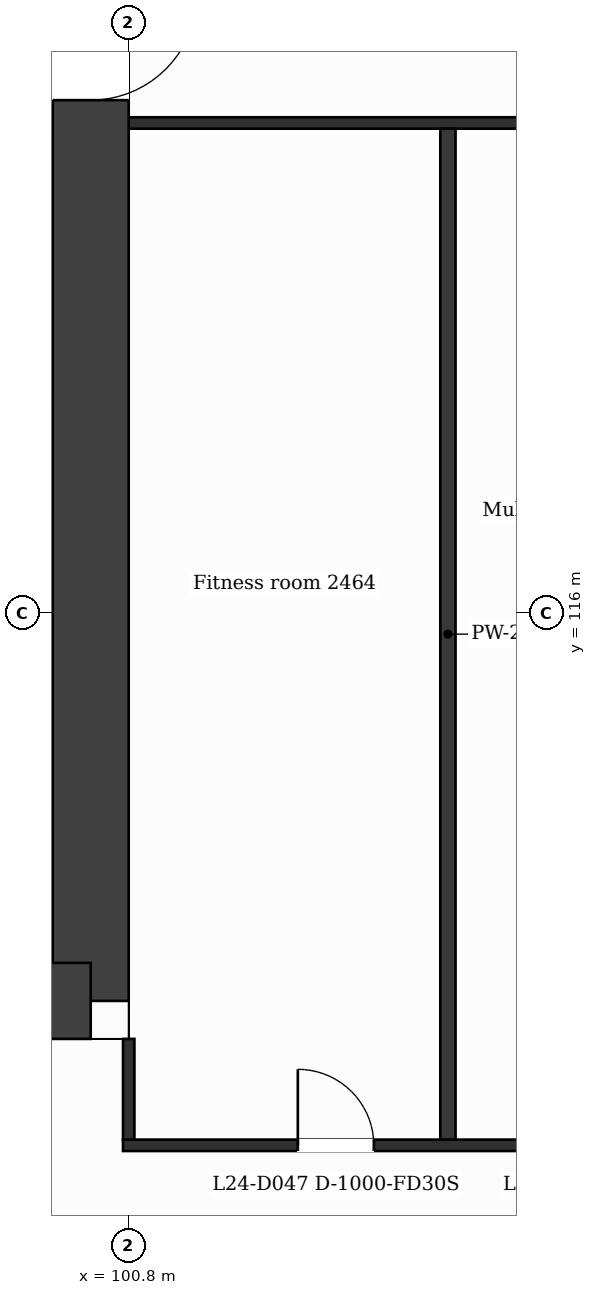
"""IFC4 building model, lengths in metres.
Left out: names, types, materials, properties, quantities, classifications, styles, units other than length and angle.
Written with IfcOpenShell. Run it as: python <this file> out.ifc"""

import sys

from ifc_helpers import new_model, si_unit, direction, frame, frame_2d, origin, place, context, subcontext, project, spatial, rectangle, extrude, element, fill, save


model = new_model("IFC4")
c1 = context("Model", 3, precision=1e-05, world=origin(), true_north=direction((0.0, 1.0)))
c2 = subcontext(c1, "Body", "Model", "MODEL_VIEW")
j1 = project(units=[si_unit("LENGTHUNIT", "METRE"), si_unit("PLANEANGLEUNIT", "RADIAN")], contexts=[c1])
p1 = place(None, origin())
s1 = spatial("IfcSite", under=j1, at=p1, CompositionType="ELEMENT")
p2 = place(p1, origin())
s2 = spatial("IfcBuilding", under=s1, at=p2, CompositionType="ELEMENT")
p3 = place(p2, frame((0.0, 0.0, 105.8)))
s3 = spatial("IfcBuildingStorey", under=s2, at=p3, CompositionType="ELEMENT", Elevation=105.8)
p4 = place(p3, frame((100.3, 131.9, 0.0), z_axis=(0.0, 0.0, 1.0), x_axis=(0.0, -1.0, 0.0)))
e1 = element("IfcWall", 1, at=p4, inside=s3, PredefinedType="SHEAR", context=c2, shape_type="SweptSolid", body=[
    extrude(rectangle(XDim=21.0, YDim=1.0, at=frame_2d((10.5, 0.0))), origin(), (0.0, 0.0, 1.0), 3.7),
])
p5 = place(p4, frame((7.75, 0.0, 0.0)))
e2 = element("IfcOpeningElement", 2, at=p5, cuts=e1, PredefinedType="OPENING", context=c2, shape_type="SweptSolid", body=[
    extrude(rectangle(XDim=1.4, YDim=2.1, at=frame_2d((0.7, 1.05))), frame((0.0, 0.51, 0.0), z_axis=(0.0, -1.0, 0.0), x_axis=(1.0, 0.0, 0.0)), (0.0, 0.0, 1.0), 1.02),
])
p6 = place(p3, frame((100.3, 110.9, 0.0), z_axis=(0.0, 0.0, 1.0), x_axis=(-1.0, 0.0, 0.0)))
e3 = element("IfcWall", 3, at=p6, inside=s3, PredefinedType="SHEAR", context=c2, shape_type="SweptSolid", body=[
    extrude(rectangle(XDim=14.059, YDim=1.0, at=frame_2d((7.03, 0.0))), origin(), (0.0, 0.0, 1.0), 3.7),
])
p7 = place(p6, frame((5.802, 0.0, 0.0)))
e4 = element("IfcOpeningElement", 4, at=p7, cuts=e3, PredefinedType="OPENING", context=c2, shape_type="SweptSolid", body=[
    extrude(rectangle(XDim=1.4, YDim=2.1, at=frame_2d((0.7, 1.05))), frame((0.0, 0.51, 0.0), z_axis=(0.0, -1.0, 0.0), x_axis=(1.0, 0.0, 0.0)), (0.0, 0.0, 1.0), 1.02),
])
p8 = place(p3, frame((94.9, 116.5, 0.0), z_axis=(0.0, 0.0, 1.0), x_axis=(1.0, 0.0, 0.0)))
e5 = element("IfcWall", 5, at=p8, inside=s3, PredefinedType="SHEAR", context=c2, shape_type="SweptSolid", body=[
    extrude(rectangle(XDim=4.9, YDim=1.0, at=frame_2d((2.45, 0.0))), origin(), (0.0, 0.0, 1.0), 3.7),
])
p9 = place(p3, frame((100.725, 109.0, 0.0), z_axis=(0.0, 0.0, 1.0), x_axis=(1.0, 0.0, 0.0)))
e6 = element("IfcWall", 6, at=p9, inside=s3, PredefinedType="PARTITIONING", context=c2, shape_type="SweptSolid", body=[
    extrude(rectangle(XDim=25.35, YDim=0.15, at=frame_2d((12.675, 0.0))), origin(), (0.0, 0.0, 1.0), 3.38),
])
p10 = place(p9, frame((2.3, 0.0, 0.0)))
e7 = element("IfcOpeningElement", 7, at=p10, cuts=e6, PredefinedType="OPENING", context=c2, shape_type="SweptSolid", body=[
    extrude(rectangle(XDim=1.0, YDim=2.1, at=frame_2d((0.5, 1.05))), frame((0.0, 0.085, 0.0), z_axis=(0.0, -1.0, 0.0), x_axis=(1.0, 0.0, 0.0)), (0.0, 0.0, 1.0), 0.17),
])
p11 = place(p9, frame((6.125, 0.0, 0.0)))
e8 = element("IfcOpeningElement", 8, at=p11, cuts=e6, PredefinedType="OPENING", context=c2, shape_type="SweptSolid", body=[
    extrude(rectangle(XDim=1.0, YDim=2.1, at=frame_2d((0.5, 1.05))), frame((0.0, 0.085, 0.0), z_axis=(0.0, -1.0, 0.0), x_axis=(1.0, 0.0, 0.0)), (0.0, 0.0, 1.0), 0.17),
])
p12 = place(p9, frame((10.075, 0.0, 0.0)))
e9 = element("IfcOpeningElement", 9, at=p12, cuts=e6, PredefinedType="OPENING", context=c2, shape_type="SweptSolid", body=[
    extrude(rectangle(XDim=1.0, YDim=2.1, at=frame_2d((0.5, 1.05))), frame((0.0, 0.085, 0.0), z_axis=(0.0, -1.0, 0.0), x_axis=(1.0, 0.0, 0.0)), (0.0, 0.0, 1.0), 0.17),
])
p13 = place(p9, frame((14.275, 0.0, 0.0)))
e10 = element("IfcOpeningElement", 10, at=p13, cuts=e6, PredefinedType="OPENING", context=c2, shape_type="SweptSolid", body=[
    extrude(rectangle(XDim=1.0, YDim=2.1, at=frame_2d((0.5, 1.05))), frame((0.0, 0.085, 0.0), z_axis=(0.0, -1.0, 0.0), x_axis=(1.0, 0.0, 0.0)), (0.0, 0.0, 1.0), 0.17),
])
p14 = place(p9, frame((17.85, 0.0, 0.0)))
e11 = element("IfcOpeningElement", 11, at=p14, cuts=e6, PredefinedType="OPENING", context=c2, shape_type="SweptSolid", body=[
    extrude(rectangle(XDim=1.0, YDim=2.1, at=frame_2d((0.5, 1.05))), frame((0.0, 0.085, 0.0), z_axis=(0.0, -1.0, 0.0), x_axis=(1.0, 0.0, 0.0)), (0.0, 0.0, 1.0), 0.17),
])
p15 = place(p9, frame((22.925, 0.0, 0.0)))
e12 = element("IfcOpeningElement", 12, at=p15, cuts=e6, PredefinedType="OPENING", context=c2, shape_type="SweptSolid", body=[
    extrude(rectangle(XDim=1.0, YDim=2.1, at=frame_2d((0.5, 1.05))), frame((0.0, 0.085, 0.0), z_axis=(0.0, -1.0, 0.0), x_axis=(1.0, 0.0, 0.0)), (0.0, 0.0, 1.0), 0.17),
])
for number, where, z_axis, x_axis in (
    (13, (95.227, 117.2, 0.0), (0.0, 0.0, 1.0), (1.0, 0.0, 0.0)),
    (14, (95.227, 118.8, 0.0), (0.0, 0.0, 1.0), (1.0, 0.0, 0.0)),
):
    element("IfcWall", number, at=place(p3, frame(where, z_axis=z_axis, x_axis=x_axis)), inside=s3, PredefinedType="PARTITIONING", context=c2, shape_type="SweptSolid", body=[
        extrude(rectangle(XDim=4.573, YDim=0.2, at=frame_2d((2.287, 0.0))), origin(), (0.0, 0.0, 1.0), 3.38),
    ])
p16 = place(p3, frame((95.227, 122.1, 0.0), z_axis=(0.0, 0.0, 1.0), x_axis=(1.0, 0.0, 0.0)))
e15 = element("IfcWall", 15, at=p16, inside=s3, PredefinedType="PARTITIONING", context=c2, shape_type="SweptSolid", body=[
    extrude(rectangle(XDim=4.573, YDim=0.2, at=frame_2d((2.287, 0.0))), origin(), (0.0, 0.0, 1.0), 3.38),
])
p17 = place(p16, frame((0.693, 0.0, 0.0)))
e16 = element("IfcOpeningElement", 16, at=p17, cuts=e15, PredefinedType="OPENING", context=c2, shape_type="SweptSolid", body=[
    extrude(rectangle(XDim=0.9, YDim=2.1, at=frame_2d((0.45, 1.05))), frame((0.0, 0.11, 0.0), z_axis=(0.0, -1.0, 0.0), x_axis=(1.0, 0.0, 0.0)), (0.0, 0.0, 1.0), 0.22),
])
p18 = place(p16, frame((2.98, 0.0, 0.0)))
e17 = element("IfcOpeningElement", 17, at=p18, cuts=e15, PredefinedType="OPENING", context=c2, shape_type="SweptSolid", body=[
    extrude(rectangle(XDim=0.9, YDim=2.1, at=frame_2d((0.45, 1.05))), frame((0.0, 0.11, 0.0), z_axis=(0.0, -1.0, 0.0), x_axis=(1.0, 0.0, 0.0)), (0.0, 0.0, 1.0), 0.22),
])
p19 = place(p3, frame((100.8, 122.45, 0.0), z_axis=(0.0, 0.0, 1.0), x_axis=(1.0, 0.0, 0.0)))
e18 = element("IfcWall", 18, at=p19, inside=s3, PredefinedType="PARTITIONING", context=c2, shape_type="SweptSolid", body=[
    extrude(rectangle(XDim=25.2, YDim=0.15, at=frame_2d((12.6, 0.0))), origin(), (0.0, 0.0, 1.0), 3.38),
])
p20 = place(p3, frame((100.8, 109.075, 0.0), z_axis=(0.0, 0.0, 1.0), x_axis=(0.0, 1.0, 0.0)))
e19 = element("IfcWall", 19, at=p20, inside=s3, PredefinedType="PARTITIONING", context=c2, shape_type="SweptSolid", body=[
    extrude(rectangle(XDim=1.325, YDim=0.15, at=frame_2d((0.663, 0.0))), origin(), (0.0, 0.0, 1.0), 3.38),
])
p21 = place(p3, frame((105.0, 109.075, 0.0), z_axis=(0.0, 0.0, 1.0), x_axis=(0.0, 1.0, 0.0)))
e20 = element("IfcWall", 20, at=p21, inside=s3, PredefinedType="PARTITIONING", context=c2, shape_type="SweptSolid", body=[
    extrude(rectangle(XDim=13.3, YDim=0.2, at=frame_2d((6.65, 0.0))), origin(), (0.0, 0.0, 1.0), 3.38),
])
p22 = place(p10, origin())
e21 = element("IfcDoor", 21, at=p22, inside=s3, OperationType="SINGLE_SWING_LEFT", PredefinedType="DOOR", context=c2, shape_type="SweptSolid", body=[
    extrude(rectangle(XDim=1.0, YDim=2.1, at=frame_2d((0.5, 1.05))), frame((0.0, 0.025, 0.0), z_axis=(0.0, -1.0, 0.0), x_axis=(1.0, 0.0, 0.0)), (0.0, 0.0, 1.0), 0.05),
])
fill(e7, e21)
p23 = place(p5, origin())
e22 = element("IfcDoor", 22, at=p23, inside=s3, OperationType="SINGLE_SWING_LEFT", PredefinedType="DOOR", context=c2, shape_type="SweptSolid", body=[
    extrude(rectangle(XDim=1.4, YDim=2.1, at=frame_2d((0.7, 1.05))), frame((0.0, 0.025, 0.0), z_axis=(0.0, -1.0, 0.0), x_axis=(1.0, 0.0, 0.0)), (0.0, 0.0, 1.0), 0.05),
])
fill(e2, e22)
save(model, sys.argv[1])
